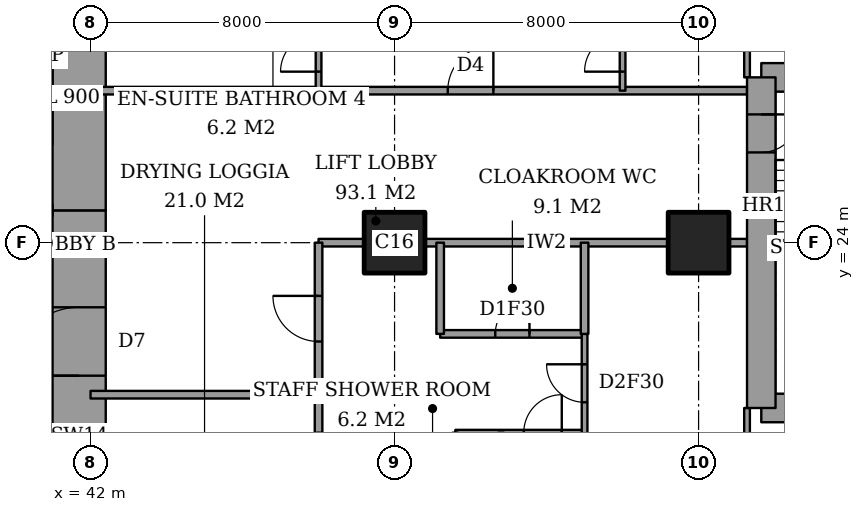
"""IFC4 building model, lengths in metres.
Left out: names, types, materials, properties, quantities, classifications, styles, units other than length and angle.
Written with IfcOpenShell. Run it as: python <this file> out.ifc"""

import sys

from ifc_helpers import new_model, si_unit, direction, frame, frame_2d, origin, origin_2d, place, context, subcontext, project, spatial, rectangle, extrude, element, fill, save


model = new_model("IFC4")
c1 = context("Model", 3, precision=1e-05, world=origin(), true_north=direction((0.0, 1.0)))
c2 = subcontext(c1, "Body", "Model", "MODEL_VIEW")
j1 = project(units=[si_unit("LENGTHUNIT", "METRE"), si_unit("PLANEANGLEUNIT", "RADIAN")], contexts=[c1])
p1 = place(None, origin())
s1 = spatial("IfcSite", under=j1, at=p1, CompositionType="ELEMENT")
p2 = place(p1, origin())
s2 = spatial("IfcBuilding", under=s1, at=p2, CompositionType="ELEMENT")
p3 = place(p2, frame((0.0, 0.0, 248.4)))
s3 = spatial("IfcBuildingStorey", under=s2, at=p3, CompositionType="ELEMENT", Elevation=248.4)
for number, where, z_axis, x_axis in (
    (1, (50.0, 24.0, 0.0), (0.0, 0.0, 1.0), (1.0, 0.0, 0.0)),
    (2, (58.0, 24.0, 0.0), (0.0, 0.0, 1.0), (1.0, 0.0, 0.0)),
):
    element("IfcColumn", number, at=place(p3, frame(where, z_axis=z_axis, x_axis=x_axis)), inside=s3, PredefinedType="COLUMN", context=c2, shape_type="SweptSolid", body=[
        extrude(rectangle(XDim=1.6, YDim=1.6, at=origin_2d()), origin(), (0.0, 0.0, 1.0), 3.6),
    ])
p4 = place(p3, frame((41.7, 13.0, 0.0), z_axis=(0.0, 0.0, 1.0), x_axis=(0.0, 1.0, 0.0)))
e3 = element("IfcWall", 3, at=p4, inside=s3, PredefinedType="SHEAR", context=c2, shape_type="SweptSolid", body=[
    extrude(rectangle(XDim=11.85, YDim=1.4, at=frame_2d((5.925, 0.0))), origin(), (0.0, 0.0, 1.0), 3.6),
])
p5 = place(p4, frame((7.5, 0.0, 0.0)))
e4 = element("IfcOpeningElement", 4, at=p5, cuts=e3, PredefinedType="OPENING", context=c2, shape_type="SweptSolid", body=[
    extrude(rectangle(XDim=1.8, YDim=2.4, at=frame_2d((0.9, 1.2))), frame((0.0, 0.71, 0.0), z_axis=(0.0, -1.0, 0.0), x_axis=(1.0, 0.0, 0.0)), (0.0, 0.0, 1.0), 1.42),
])
p6 = place(p3, frame((41.7, 24.85, 0.0), z_axis=(0.0, 0.0, 1.0), x_axis=(0.0, 1.0, 0.0)))
e5 = element("IfcWall", 5, at=p6, inside=s3, PredefinedType="SHEAR", context=c2, shape_type="SweptSolid", body=[
    extrude(rectangle(XDim=10.15, YDim=1.4, at=frame_2d((5.075, 0.0))), origin(), (0.0, 0.0, 1.0), 3.6),
])
for number, where, z_axis, x_axis in (
    (6, (59.65, 19.65, 0.0), (0.0, 0.0, 1.0), (1.0, 0.0, 0.0)),
    (7, (64.1, 28.35, 0.0), (0.0, 0.0, 1.0), (-1.0, 0.0, 0.0)),
):
    element("IfcWall", number, at=place(p3, frame(where, z_axis=z_axis, x_axis=x_axis)), inside=s3, PredefinedType="SHEAR", context=c2, shape_type="SweptSolid", body=[
        extrude(rectangle(XDim=4.45, YDim=0.75, at=frame_2d((2.225, 0.0))), origin(), (0.0, 0.0, 1.0), 3.6),
    ])
p7 = place(p3, frame((59.65, 28.35, 0.0), z_axis=(0.0, 0.0, 1.0), x_axis=(0.0, -1.0, 0.0)))
e8 = element("IfcWall", 8, at=p7, inside=s3, PredefinedType="SHEAR", context=c2, shape_type="SweptSolid", body=[
    extrude(rectangle(XDim=8.7, YDim=0.75, at=frame_2d((4.35, 0.0))), origin(), (0.0, 0.0, 1.0), 3.6),
])
p8 = place(p7, frame((0.975, 0.0, 0.0)))
e9 = element("IfcOpeningElement", 9, at=p8, cuts=e8, PredefinedType="OPENING", context=c2, shape_type="SweptSolid", body=[
    extrude(rectangle(XDim=1.0, YDim=2.1, at=frame_2d((0.5, 1.05))), frame((0.0, 0.385, 0.0), z_axis=(0.0, -1.0, 0.0), x_axis=(1.0, 0.0, 0.0)), (0.0, 0.0, 1.0), 0.77),
])
p9 = place(p3, frame((51.6, 19.0, 0.0), z_axis=(0.0, 0.0, 1.0), x_axis=(1.0, 0.0, 0.0)))
e10 = element("IfcWall", 10, at=p9, inside=s3, PredefinedType="PARTITIONING", context=c2, shape_type="SweptSolid", body=[
    extrude(rectangle(XDim=3.4, YDim=0.15, at=frame_2d((1.7, 0.0))), origin(), (0.0, 0.0, 1.0), 3.35),
])
p10 = place(p9, frame((1.8, 0.0, 0.0)))
e11 = element("IfcOpeningElement", 11, at=p10, cuts=e10, PredefinedType="OPENING", context=c2, shape_type="SweptSolid", body=[
    extrude(rectangle(XDim=1.0, YDim=2.1, at=frame_2d((0.5, 1.05))), frame((0.0, 0.085, 0.0), z_axis=(0.0, -1.0, 0.0), x_axis=(1.0, 0.0, 0.0)), (0.0, 0.0, 1.0), 0.17),
])
p11 = place(p3, frame((42.0, 20.0, 0.0), z_axis=(0.0, 0.0, 1.0), x_axis=(1.0, 0.0, 0.0)))
e12 = element("IfcWall", 12, at=p11, inside=s3, PredefinedType="PARTITIONING", context=c2, shape_type="SweptSolid", body=[
    extrude(rectangle(XDim=6.0, YDim=0.2, at=frame_2d((3.0, 0.0))), origin(), (0.0, 0.0, 1.0), 3.35),
])
p12 = place(p3, frame((51.2, 21.6, 0.0), z_axis=(0.0, 0.0, 1.0), x_axis=(1.0, 0.0, 0.0)))
e13 = element("IfcWall", 13, at=p12, inside=s3, PredefinedType="PARTITIONING", context=c2, shape_type="SweptSolid", body=[
    extrude(rectangle(XDim=3.8, YDim=0.2, at=frame_2d((1.9, 0.0))), origin(), (0.0, 0.0, 1.0), 3.35),
])
p13 = place(p12, frame((1.45, 0.0, 0.0)))
e14 = element("IfcOpeningElement", 14, at=p13, cuts=e13, PredefinedType="OPENING", context=c2, shape_type="SweptSolid", body=[
    extrude(rectangle(XDim=0.9, YDim=2.1, at=frame_2d((0.45, 1.05))), frame((0.0, 0.11, 0.0), z_axis=(0.0, -1.0, 0.0), x_axis=(1.0, 0.0, 0.0)), (0.0, 0.0, 1.0), 0.22),
])
p14 = place(p3, frame((48.0, 24.0, 0.0), z_axis=(0.0, 0.0, 1.0), x_axis=(1.0, 0.0, 0.0)))
e15 = element("IfcWall", 15, at=p14, inside=s3, PredefinedType="PARTITIONING", context=c2, shape_type="SweptSolid", body=[
    extrude(rectangle(XDim=1.2, YDim=0.2, at=frame_2d((0.6, 0.0))), origin(), (0.0, 0.0, 1.0), 3.35),
])
p15 = place(p3, frame((50.8, 24.0, 0.0), z_axis=(0.0, 0.0, 1.0), x_axis=(1.0, 0.0, 0.0)))
e16 = element("IfcWall", 16, at=p15, inside=s3, PredefinedType="PARTITIONING", context=c2, shape_type="SweptSolid", body=[
    extrude(rectangle(XDim=6.4, YDim=0.2, at=frame_2d((3.2, 0.0))), origin(), (0.0, 0.0, 1.0), 3.35),
])
p16 = place(p3, frame((58.8, 24.0, 0.0), z_axis=(0.0, 0.0, 1.0), x_axis=(1.0, 0.0, 0.0)))
e17 = element("IfcWall", 17, at=p16, inside=s3, PredefinedType="PARTITIONING", context=c2, shape_type="SweptSolid", body=[
    extrude(rectangle(XDim=0.475, YDim=0.2, at=frame_2d((0.237, 0.0))), origin(), (0.0, 0.0, 1.0), 3.35),
])
p17 = place(p3, frame((42.0, 28.0, 0.0), z_axis=(0.0, 0.0, 1.0), x_axis=(1.0, 0.0, 0.0)))
e18 = element("IfcWall", 18, at=p17, inside=s3, PredefinedType="PARTITIONING", context=c2, shape_type="SweptSolid", body=[
    extrude(rectangle(XDim=17.275, YDim=0.2, at=frame_2d((8.637, 0.0))), origin(), (0.0, 0.0, 1.0), 3.35),
])
p18 = place(p17, frame((9.4, 0.0, 0.0)))
e19 = element("IfcOpeningElement", 19, at=p18, cuts=e18, PredefinedType="OPENING", context=c2, shape_type="SweptSolid", body=[
    extrude(rectangle(XDim=1.2, YDim=2.4, at=frame_2d((0.6, 1.2))), frame((0.0, 0.11, 0.0), z_axis=(0.0, -1.0, 0.0), x_axis=(1.0, 0.0, 0.0)), (0.0, 0.0, 1.0), 0.22),
])
p19 = place(p3, frame((48.0, 19.0, 0.0), z_axis=(0.0, 0.0, 1.0), x_axis=(0.0, 1.0, 0.0)))
e20 = element("IfcWall", 20, at=p19, inside=s3, PredefinedType="PARTITIONING", context=c2, shape_type="SweptSolid", body=[
    extrude(rectangle(XDim=5.0, YDim=0.2, at=frame_2d((2.5, 0.0))), origin(), (0.0, 0.0, 1.0), 3.35),
])
p20 = place(p19, frame((2.4, 0.0, 0.0)))
e21 = element("IfcOpeningElement", 21, at=p20, cuts=e20, PredefinedType="OPENING", context=c2, shape_type="SweptSolid", body=[
    extrude(rectangle(XDim=1.2, YDim=2.4, at=frame_2d((0.6, 1.2))), frame((0.0, 0.11, 0.0), z_axis=(0.0, -1.0, 0.0), x_axis=(1.0, 0.0, 0.0)), (0.0, 0.0, 1.0), 0.22),
])
p21 = place(p3, frame((48.0, 28.0, 0.0), z_axis=(0.0, 0.0, 1.0), x_axis=(0.0, 1.0, 0.0)))
e22 = element("IfcWall", 22, at=p21, inside=s3, PredefinedType="PARTITIONING", context=c2, shape_type="SweptSolid", body=[
    extrude(rectangle(XDim=9.2, YDim=0.15, at=frame_2d((4.6, 0.0))), origin(), (0.0, 0.0, 1.0), 3.35),
])
p22 = place(p21, frame((0.5, 0.0, 0.0)))
e23 = element("IfcOpeningElement", 23, at=p22, cuts=e22, PredefinedType="OPENING", context=c2, shape_type="SweptSolid", body=[
    extrude(rectangle(XDim=1.0, YDim=2.1, at=frame_2d((0.5, 1.05))), frame((0.0, 0.085, 0.0), z_axis=(0.0, -1.0, 0.0), x_axis=(1.0, 0.0, 0.0)), (0.0, 0.0, 1.0), 0.17),
])
p23 = place(p3, frame((51.2, 21.6, 0.0), z_axis=(0.0, 0.0, 1.0), x_axis=(0.0, 1.0, 0.0)))
e24 = element("IfcWall", 24, at=p23, inside=s3, PredefinedType="PARTITIONING", context=c2, shape_type="SweptSolid", body=[
    extrude(rectangle(XDim=2.4, YDim=0.2, at=frame_2d((1.2, 0.0))), origin(), (0.0, 0.0, 1.0), 3.35),
])
p24 = place(p3, frame((51.6, 16.05, 0.0), z_axis=(0.0, 0.0, 1.0), x_axis=(0.0, 1.0, 0.0)))
e25 = element("IfcWall", 25, at=p24, inside=s3, PredefinedType="PARTITIONING", context=c2, shape_type="SweptSolid", body=[
    extrude(rectangle(XDim=2.95, YDim=0.15, at=frame_2d((1.475, 0.0))), origin(), (0.0, 0.0, 1.0), 3.35),
])
p25 = place(p3, frame((55.0, 21.6, 0.0), z_axis=(0.0, 0.0, 1.0), x_axis=(0.0, 1.0, 0.0)))
e26 = element("IfcWall", 26, at=p25, inside=s3, PredefinedType="PARTITIONING", context=c2, shape_type="SweptSolid", body=[
    extrude(rectangle(XDim=2.4, YDim=0.2, at=frame_2d((1.2, 0.0))), origin(), (0.0, 0.0, 1.0), 3.35),
])
p26 = place(p3, frame((55.0, 10.6, 0.0), z_axis=(0.0, 0.0, 1.0), x_axis=(0.0, 1.0, 0.0)))
e27 = element("IfcWall", 27, at=p26, inside=s3, PredefinedType="PARTITIONING", context=c2, shape_type="SweptSolid", body=[
    extrude(rectangle(XDim=11.0, YDim=0.15, at=frame_2d((5.5, 0.0))), origin(), (0.0, 0.0, 1.0), 3.35),
])
p27 = place(p26, frame((9.2, 0.0, 0.0)))
e28 = element("IfcOpeningElement", 28, at=p27, cuts=e27, PredefinedType="OPENING", context=c2, shape_type="SweptSolid", body=[
    extrude(rectangle(XDim=1.0, YDim=2.1, at=frame_2d((0.5, 1.05))), frame((0.0, 0.085, 0.0), z_axis=(0.0, -1.0, 0.0), x_axis=(1.0, 0.0, 0.0)), (0.0, 0.0, 1.0), 0.17),
])
p28 = place(p3, frame((56.0, 28.0, 0.0), z_axis=(0.0, 0.0, 1.0), x_axis=(0.0, 1.0, 0.0)))
e29 = element("IfcWall", 29, at=p28, inside=s3, PredefinedType="PARTITIONING", context=c2, shape_type="SweptSolid", body=[
    extrude(rectangle(XDim=9.2, YDim=0.15, at=frame_2d((4.6, 0.0))), origin(), (0.0, 0.0, 1.0), 3.35),
])
p29 = place(p28, frame((0.5, 0.0, 0.0)))
e30 = element("IfcOpeningElement", 30, at=p29, cuts=e29, PredefinedType="OPENING", context=c2, shape_type="SweptSolid", body=[
    extrude(rectangle(XDim=1.0, YDim=2.1, at=frame_2d((0.5, 1.05))), frame((0.0, 0.085, 0.0), z_axis=(0.0, -1.0, 0.0), x_axis=(1.0, 0.0, 0.0)), (0.0, 0.0, 1.0), 0.17),
])
p30 = place(p3, frame((59.275, 17.2, 0.0), z_axis=(0.0, 0.0, 1.0), x_axis=(0.0, 1.0, 0.0)))
e31 = element("IfcWall", 31, at=p30, inside=s3, PredefinedType="PARTITIONING", context=c2, shape_type="SweptSolid", body=[
    extrude(rectangle(XDim=2.45, YDim=0.15, at=frame_2d((1.225, 0.0))), origin(), (0.0, 0.0, 1.0), 3.35),
])
p31 = place(p30, frame((0.538, 0.0, 0.0)))
e32 = element("IfcOpeningElement", 32, at=p31, cuts=e31, PredefinedType="OPENING", context=c2, shape_type="SweptSolid", body=[
    extrude(rectangle(XDim=1.0, YDim=2.1, at=frame_2d((0.5, 1.05))), frame((0.0, 0.085, 0.0), z_axis=(0.0, -1.0, 0.0), x_axis=(1.0, 0.0, 0.0)), (0.0, 0.0, 1.0), 0.17),
])
p32 = place(p3, frame((59.275, 28.35, 0.0), z_axis=(0.0, 0.0, 1.0), x_axis=(0.0, 1.0, 0.0)))
e33 = element("IfcWall", 33, at=p32, inside=s3, PredefinedType="PARTITIONING", context=c2, shape_type="SweptSolid", body=[
    extrude(rectangle(XDim=2.45, YDim=0.15, at=frame_2d((1.225, 0.0))), origin(), (0.0, 0.0, 1.0), 3.35),
])
p33 = place(p32, frame((0.913, 0.0, 0.0)))
e34 = element("IfcOpeningElement", 34, at=p33, cuts=e33, PredefinedType="OPENING", context=c2, shape_type="SweptSolid", body=[
    extrude(rectangle(XDim=1.0, YDim=2.1, at=frame_2d((0.5, 1.05))), frame((0.0, 0.085, 0.0), z_axis=(0.0, -1.0, 0.0), x_axis=(1.0, 0.0, 0.0)), (0.0, 0.0, 1.0), 0.17),
])
p34 = place(p27, origin())
e35 = element("IfcDoor", 35, at=p34, inside=s3, OperationType="SINGLE_SWING_LEFT", PredefinedType="DOOR", context=c2, shape_type="SweptSolid", body=[
    extrude(rectangle(XDim=1.0, YDim=2.1, at=frame_2d((0.5, 1.05))), frame((0.0, 0.025, 0.0), z_axis=(0.0, -1.0, 0.0), x_axis=(1.0, 0.0, 0.0)), (0.0, 0.0, 1.0), 0.05),
])
fill(e28, e35)
p35 = place(p13, origin())
e36 = element("IfcDoor", 36, at=p35, inside=s3, OperationType="SINGLE_SWING_LEFT", PredefinedType="DOOR", context=c2, shape_type="SweptSolid", body=[
    extrude(rectangle(XDim=0.9, YDim=2.1, at=frame_2d((0.45, 1.05))), frame((0.0, 0.025, 0.0), z_axis=(0.0, -1.0, 0.0), x_axis=(1.0, 0.0, 0.0)), (0.0, 0.0, 1.0), 0.05),
])
fill(e14, e36)
p36 = place(p20, origin())
e37 = element("IfcDoor", 37, at=p36, inside=s3, OperationType="SINGLE_SWING_LEFT", PredefinedType="DOOR", context=c2, shape_type="SweptSolid", body=[
    extrude(rectangle(XDim=1.2, YDim=2.4, at=frame_2d((0.6, 1.2))), frame((0.0, 0.025, 0.0), z_axis=(0.0, -1.0, 0.0), x_axis=(1.0, 0.0, 0.0)), (0.0, 0.0, 1.0), 0.05),
])
fill(e21, e37)
p37 = place(p10, origin())
e38 = element("IfcDoor", 38, at=p37, inside=s3, OperationType="SINGLE_SWING_LEFT", PredefinedType="DOOR", context=c2, shape_type="SweptSolid", body=[
    extrude(rectangle(XDim=1.0, YDim=2.1, at=frame_2d((0.5, 1.05))), frame((0.0, 0.025, 0.0), z_axis=(0.0, -1.0, 0.0), x_axis=(1.0, 0.0, 0.0)), (0.0, 0.0, 1.0), 0.05),
])
fill(e11, e38)
p38 = place(p29, origin())
e39 = element("IfcDoor", 39, at=p38, inside=s3, OperationType="SINGLE_SWING_RIGHT", PredefinedType="DOOR", context=c2, shape_type="SweptSolid", body=[
    extrude(rectangle(XDim=1.0, YDim=2.1, at=frame_2d((0.5, 1.05))), frame((0.0, 0.025, 0.0), z_axis=(0.0, -1.0, 0.0), x_axis=(1.0, 0.0, 0.0)), (0.0, 0.0, 1.0), 0.05),
])
fill(e30, e39)
p39 = place(p18, origin())
e40 = element("IfcDoor", 40, at=p39, inside=s3, OperationType="SINGLE_SWING_LEFT", PredefinedType="DOOR", context=c2, shape_type="SweptSolid", body=[
    extrude(rectangle(XDim=1.2, YDim=2.4, at=frame_2d((0.6, 1.2))), frame((0.0, 0.025, 0.0), z_axis=(0.0, -1.0, 0.0), x_axis=(1.0, 0.0, 0.0)), (0.0, 0.0, 1.0), 0.05),
])
fill(e19, e40)
p40 = place(p22, origin())
e41 = element("IfcDoor", 41, at=p40, inside=s3, OperationType="SINGLE_SWING_RIGHT", PredefinedType="DOOR", context=c2, shape_type="SweptSolid", body=[
    extrude(rectangle(XDim=1.0, YDim=2.1, at=frame_2d((0.5, 1.05))), frame((0.0, 0.025, 0.0), z_axis=(0.0, -1.0, 0.0), x_axis=(1.0, 0.0, 0.0)), (0.0, 0.0, 1.0), 0.05),
])
fill(e23, e41)
p41 = place(p5, origin())
e42 = element("IfcDoor", 42, at=p41, inside=s3, OperationType="DOUBLE_DOOR_DOUBLE_SWING", PredefinedType="DOOR", context=c2, shape_type="SweptSolid", body=[
    extrude(rectangle(XDim=1.8, YDim=2.4, at=frame_2d((0.9, 1.2))), frame((0.0, 0.025, 0.0), z_axis=(0.0, -1.0, 0.0), x_axis=(1.0, 0.0, 0.0)), (0.0, 0.0, 1.0), 0.05),
])
fill(e4, e42)
p42 = place(p8, origin())
e43 = element("IfcDoor", 43, at=p42, inside=s3, OperationType="SINGLE_SWING_RIGHT", PredefinedType="DOOR", context=c2, shape_type="SweptSolid", body=[
    extrude(rectangle(XDim=1.0, YDim=2.1, at=frame_2d((0.5, 1.05))), frame((0.0, 0.025, 0.0), z_axis=(0.0, -1.0, 0.0), x_axis=(1.0, 0.0, 0.0)), (0.0, 0.0, 1.0), 0.05),
])
fill(e9, e43)
save(model, sys.argv[1])
